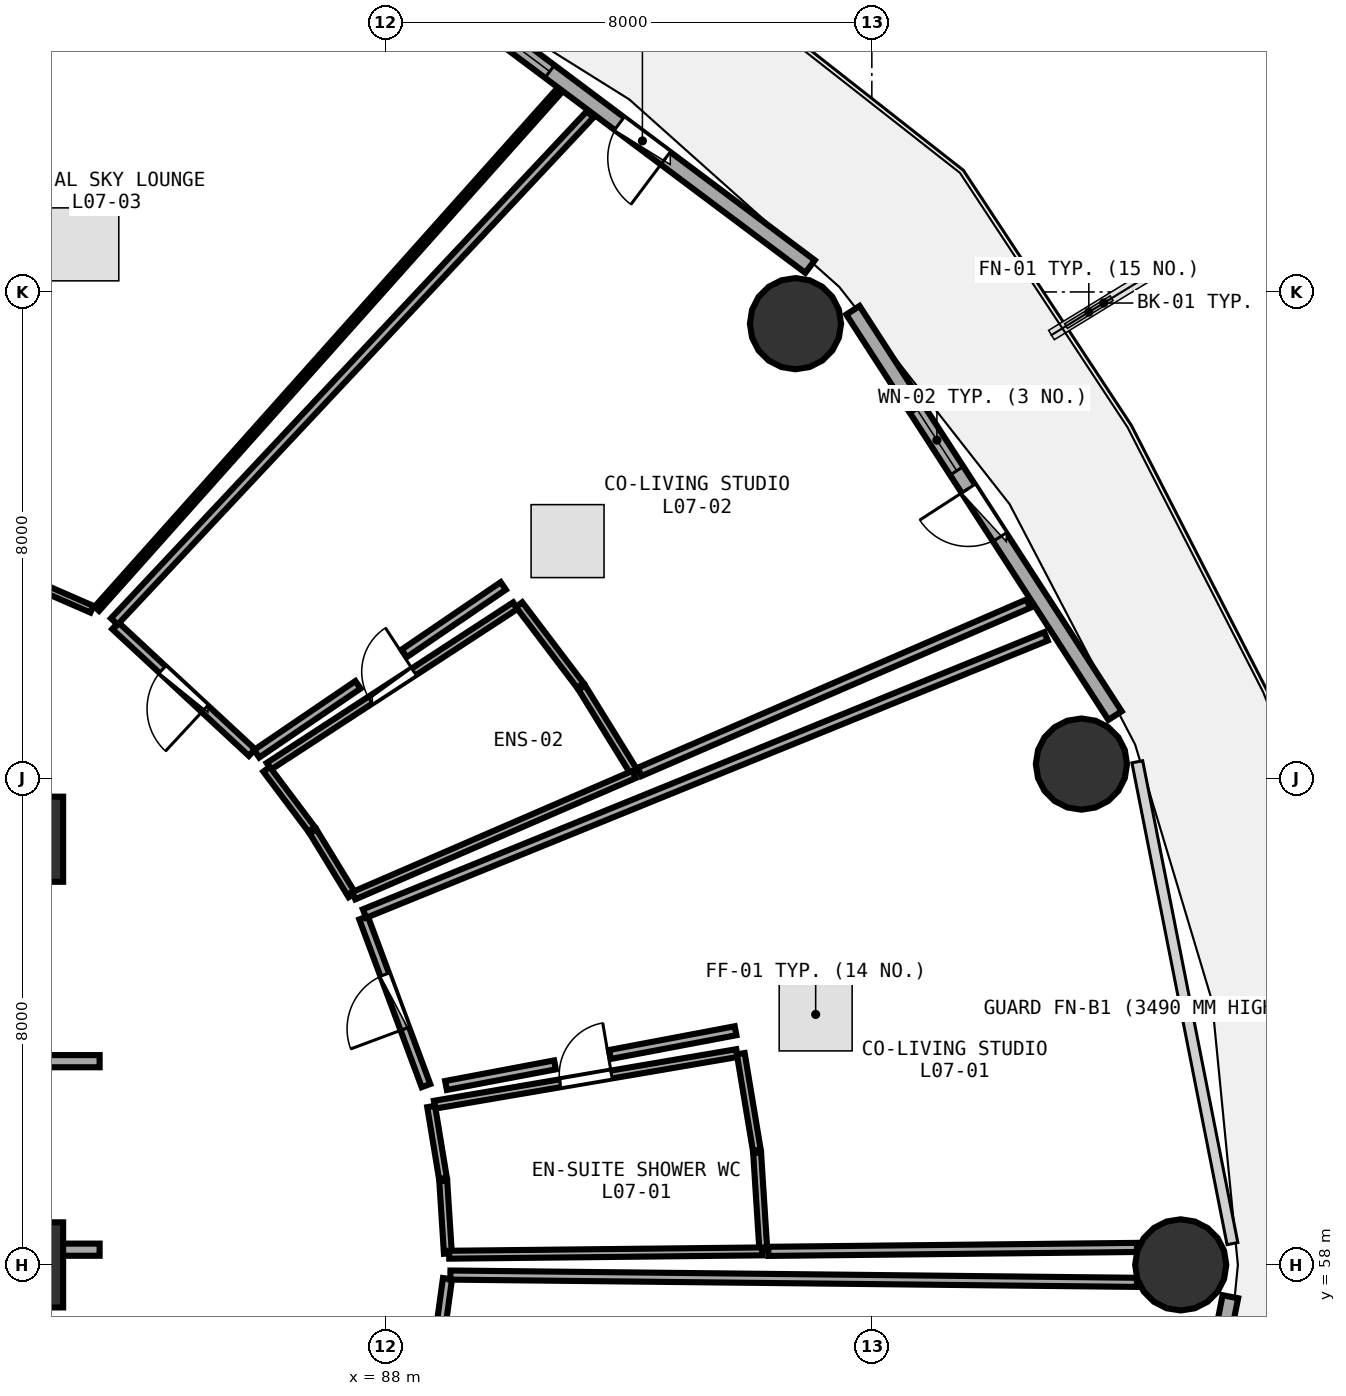
"""IFC4 building model, lengths in metres.
Left out: names, types, materials, properties, quantities, classifications, styles, units other than length and angle.
Written with IfcOpenShell. Run it as: python <this file> out.ifc"""

import sys

from ifc_helpers import new_model, si_unit, direction, frame, frame_2d, origin, origin_2d, place, context, subcontext, project, spatial, rectangle, circle, extrude, element, fill, save


model = new_model("IFC4")
c1 = context("Model", 3, precision=1e-05, world=origin(), true_north=direction((0.0, 1.0)))
c2 = subcontext(c1, "Body", "Model", "MODEL_VIEW")
j1 = project(units=[si_unit("LENGTHUNIT", "METRE"), si_unit("PLANEANGLEUNIT", "RADIAN")], contexts=[c1])
p1 = place(None, origin())
s1 = spatial("IfcSite", under=j1, at=p1, CompositionType="ELEMENT")
p2 = place(p1, origin())
s2 = spatial("IfcBuilding", under=s1, at=p2, CompositionType="ELEMENT")
p3 = place(p2, frame((0.0, 0.0, 30.0)))
s3 = spatial("IfcBuildingStorey", under=s2, at=p3, CompositionType="ELEMENT", Elevation=30.0)
for number, where, z_axis, x_axis in (
    (1, (82.0, 58.0, 0.0), (0.0, 0.0, 1.0), (1.0, 0.0, 0.0)),
    (2, (82.0, 65.0, 0.0), (0.0, 0.0, 1.0), (1.0, 0.0, 0.0)),
):
    element("IfcColumn", number, at=place(p3, frame(where, z_axis=z_axis, x_axis=x_axis)), inside=s3, PredefinedType="PILASTER", context=c2, shape_type="SweptSolid", body=[
        extrude(rectangle(XDim=1.4, YDim=1.4, at=origin_2d()), origin(), (0.0, 0.0, 1.0), 3.75),
    ])
for number, where, z_axis, x_axis in (
    (3, (101.08, 58.0, 0.0), (0.0, 0.0, 1.0), (1.0, 0.0, 0.0)),
    (4, (99.447, 66.236, 0.0), (0.0, 0.0, 1.0), (1.0, 0.0, 0.0)),
    (5, (94.744, 73.478, 0.0), (0.0, 0.0, 1.0), (1.0, 0.0, 0.0)),
):
    element("IfcColumn", number, at=place(p3, frame(where, z_axis=z_axis, x_axis=x_axis)), inside=s3, PredefinedType="COLUMN", context=c2, shape_type="SweptSolid", body=[
        extrude(circle(Radius=0.75, at=origin_2d()), origin(), (0.0, 0.0, 1.0), 3.75),
    ])
p4 = place(p3, frame((99.999, 67.033, 0.0), z_axis=(0.0, 0.0, 1.0), x_axis=(-0.543005114258, 0.839729388488, 0.0)))
e6 = element("IfcWall", 6, at=p4, inside=s3, PredefinedType="SOLIDWALL", context=c2, shape_type="SweptSolid", body=[
    extrude(rectangle(XDim=7.938, YDim=0.26, at=frame_2d((3.969, 0.0))), origin(), (0.0, 0.0, 1.0), 3.475),
])
p5 = place(p4, frame((3.494, 0.0, 0.0)))
e7 = element("IfcOpeningElement", 7, at=p5, cuts=e6, PredefinedType="OPENING", context=c2, shape_type="SweptSolid", body=[
    extrude(rectangle(XDim=0.95, YDim=2.1, at=frame_2d((0.475, 1.05))), frame((0.0, 0.14, 0.0), z_axis=(0.0, -1.0, 0.0), x_axis=(1.0, 0.0, 0.0)), (0.0, 0.0, 1.0), 0.28),
])
p6 = place(p4, frame((4.794, 0.0, 0.85)))
e8 = element("IfcOpeningElement", 8, at=p6, cuts=e6, PredefinedType="OPENING", context=c2, shape_type="SweptSolid", body=[
    extrude(rectangle(XDim=1.2, YDim=1.45, at=frame_2d((0.6, 0.725))), frame((0.0, 0.14, 0.0), z_axis=(0.0, -1.0, 0.0), x_axis=(1.0, 0.0, 0.0)), (0.0, 0.0, 1.0), 0.28),
])
p7 = place(p3, frame((94.984, 74.418, 0.0), z_axis=(0.0, 0.0, 1.0), x_axis=(-0.80030733173, 0.599590005569, 0.0)))
e9 = element("IfcWall", 9, at=p7, inside=s3, PredefinedType="SOLIDWALL", context=c2, shape_type="SweptSolid", body=[
    extrude(rectangle(XDim=8.291, YDim=0.26, at=frame_2d((4.145, 0.0))), origin(), (0.0, 0.0, 1.0), 3.475),
])
p8 = place(p7, frame((2.97, 0.0, 0.0)))
e10 = element("IfcOpeningElement", 10, at=p8, cuts=e9, PredefinedType="OPENING", context=c2, shape_type="SweptSolid", body=[
    extrude(rectangle(XDim=0.95, YDim=2.1, at=frame_2d((0.475, 1.05))), frame((0.0, 0.14, 0.0), z_axis=(0.0, -1.0, 0.0), x_axis=(1.0, 0.0, 0.0)), (0.0, 0.0, 1.0), 0.28),
])
p9 = place(p7, frame((5.35, 0.0, 0.85)))
e11 = element("IfcOpeningElement", 11, at=p9, cuts=e9, PredefinedType="OPENING", context=c2, shape_type="SweptSolid", body=[
    extrude(rectangle(XDim=1.2, YDim=1.45, at=frame_2d((0.6, 0.725))), frame((0.0, 0.14, 0.0), z_axis=(0.0, -1.0, 0.0), x_axis=(1.0, 0.0, 0.0)), (0.0, 0.0, 1.0), 0.28),
])
p10 = place(p3, frame((100.404, 49.92, 0.0), z_axis=(0.0, 0.0, 1.0), x_axis=(0.193726159581, 0.98105564322, 0.0)))
e12 = element("IfcWall", 12, at=p10, inside=s3, PredefinedType="SOLIDWALL", context=c2, shape_type="SweptSolid", body=[
    extrude(rectangle(XDim=7.703, YDim=0.26, at=frame_2d((3.851, 0.0))), origin(), (0.0, 0.0, 1.0), 3.475),
])
p11 = place(p10, frame((3.051, 0.0, 0.85)))
e13 = element("IfcOpeningElement", 13, at=p11, cuts=e12, PredefinedType="OPENING", context=c2, shape_type="SweptSolid", body=[
    extrude(rectangle(XDim=1.6, YDim=1.45, at=frame_2d((0.8, 0.725))), frame((0.0, 0.14, 0.0), z_axis=(0.0, -1.0, 0.0), x_axis=(1.0, 0.0, 0.0)), (0.0, 0.0, 1.0), 0.28),
])
p12 = place(p3, frame((79.3, 61.35, 0.0), z_axis=(0.0, 0.0, 1.0), x_axis=(1.0, 0.0, 0.0)))
e14 = element("IfcWall", 14, at=p12, inside=s3, PredefinedType="SOLIDWALL", context=c2, shape_type="SweptSolid", body=[
    extrude(rectangle(XDim=4.0, YDim=0.2, at=frame_2d((2.0, 0.0))), origin(), (0.0, 0.0, 1.0), 2.775),
])
p13 = place(p12, frame((0.45, 0.0, 0.0)))
e15 = element("IfcOpeningElement", 15, at=p13, cuts=e14, PredefinedType="OPENING", context=c2, shape_type="SweptSolid", body=[
    extrude(rectangle(XDim=1.2, YDim=2.15, at=frame_2d((0.6, 1.075))), frame((0.0, 0.11, 0.0), z_axis=(0.0, -1.0, 0.0), x_axis=(1.0, 0.0, 0.0)), (0.0, 0.0, 1.0), 0.22),
])
p14 = place(p3, frame((79.3, 58.25, 0.0), z_axis=(0.0, 0.0, 1.0), x_axis=(1.0, 0.0, 0.0)))
e16 = element("IfcWall", 16, at=p14, inside=s3, PredefinedType="SOLIDWALL", context=c2, shape_type="SweptSolid", body=[
    extrude(rectangle(XDim=4.0, YDim=0.2, at=frame_2d((2.0, 0.0))), origin(), (0.0, 0.0, 1.0), 2.775),
])
p15 = place(p14, frame((0.5, 0.0, 0.0)))
e17 = element("IfcOpeningElement", 17, at=p15, cuts=e16, PredefinedType="OPENING", context=c2, shape_type="SweptSolid", body=[
    extrude(rectangle(XDim=1.1, YDim=2.1, at=frame_2d((0.55, 1.05))), frame((0.0, 0.11, 0.0), z_axis=(0.0, -1.0, 0.0), x_axis=(1.0, 0.0, 0.0)), (0.0, 0.0, 1.0), 0.22),
])
p16 = place(p3, frame((88.808, 60.634, 0.0), z_axis=(0.0, 0.0, 1.0), x_axis=(0.985746995542, 0.168234540986, 0.0)))
e18 = element("IfcWall", 18, at=p16, inside=s3, PredefinedType="PLUMBINGWALL", context=c2, shape_type="SweptSolid", body=[
    extrude(rectangle(XDim=5.046, YDim=0.13, at=frame_2d((2.523, 0.0))), origin(), (0.0, 0.0, 1.0), 3.175),
])
p17 = place(p16, frame((2.093, 0.0, 0.0)))
e19 = element("IfcOpeningElement", 19, at=p17, cuts=e18, PredefinedType="OPENING", context=c2, shape_type="SweptSolid", body=[
    extrude(rectangle(XDim=0.86, YDim=2.05, at=frame_2d((0.43, 1.025))), frame((0.0, 0.075, 0.0), z_axis=(0.0, -1.0, 0.0), x_axis=(1.0, 0.0, 0.0)), (0.0, 0.0, 1.0), 0.15),
])
p18 = place(p3, frame((88.667, 60.948, 0.0), z_axis=(0.0, 0.0, 1.0), x_axis=(-0.348640514247, 0.937256524024, 0.0)))
e20 = element("IfcWall", 20, at=p18, inside=s3, PredefinedType="PARTITIONING", context=c2, shape_type="SweptSolid", body=[
    extrude(rectangle(XDim=2.943, YDim=0.15, at=frame_2d((1.472, 0.0))), origin(), (0.0, 0.0, 1.0), 3.48),
])
p19 = place(p18, frame((0.997, 0.0, 0.0)))
e21 = element("IfcOpeningElement", 21, at=p19, cuts=e20, PredefinedType="OPENING", context=c2, shape_type="SweptSolid", body=[
    extrude(rectangle(XDim=0.95, YDim=2.08, at=frame_2d((0.475, 1.04))), frame((0.0, 0.085, 0.0), z_axis=(0.0, -1.0, 0.0), x_axis=(1.0, 0.0, 0.0)), (0.0, 0.0, 1.0), 0.17),
])
p20 = place(p3, frame((86.083, 66.2, 0.0), z_axis=(0.0, 0.0, 1.0), x_axis=(0.837796261941, 0.545982988267, 0.0)))
e22 = element("IfcWall", 22, at=p20, inside=s3, PredefinedType="PLUMBINGWALL", context=c2, shape_type="SweptSolid", body=[
    extrude(rectangle(XDim=4.838, YDim=0.13, at=frame_2d((2.419, 0.0))), origin(), (0.0, 0.0, 1.0), 3.235),
])
p21 = place(p20, frame((1.989, 0.0, 0.0)))
e23 = element("IfcOpeningElement", 23, at=p21, cuts=e22, PredefinedType="OPENING", context=c2, shape_type="SweptSolid", body=[
    extrude(rectangle(XDim=0.86, YDim=2.05, at=frame_2d((0.43, 1.025))), frame((0.0, 0.075, 0.0), z_axis=(0.0, -1.0, 0.0), x_axis=(1.0, 0.0, 0.0)), (0.0, 0.0, 1.0), 0.15),
])
p22 = place(p3, frame((85.806, 66.425, 0.0), z_axis=(0.0, 0.0, 1.0), x_axis=(-0.7329267348, 0.680307578538, 0.0)))
e24 = element("IfcWall", 24, at=p22, inside=s3, PredefinedType="PARTITIONING", context=c2, shape_type="SweptSolid", body=[
    extrude(rectangle(XDim=3.067, YDim=0.15, at=frame_2d((1.533, 0.0))), origin(), (0.0, 0.0, 1.0), 2.875),
])
p23 = place(p22, frame((1.059, 0.0, 0.0)))
e25 = element("IfcOpeningElement", 25, at=p23, cuts=e24, PredefinedType="OPENING", context=c2, shape_type="SweptSolid", body=[
    extrude(rectangle(XDim=0.95, YDim=2.08, at=frame_2d((0.475, 1.04))), frame((0.0, 0.085, 0.0), z_axis=(0.0, -1.0, 0.0), x_axis=(1.0, 0.0, 0.0)), (0.0, 0.0, 1.0), 0.17),
])
p24 = place(p3, frame((83.172, 68.783, 0.0), z_axis=(0.0, 0.0, 1.0), x_axis=(-0.916419655578, 0.400218708797, 0.0)))
e26 = element("IfcWall", 26, at=p24, inside=s3, PredefinedType="PARTITIONING", context=c2, shape_type="SweptSolid", body=[
    extrude(rectangle(XDim=6.104, YDim=0.12, at=frame_2d((3.052, 0.0))), origin(), (0.0, 0.0, 1.0), 2.875),
])
p25 = place(p24, frame((2.602, 0.0, 0.0)))
e27 = element("IfcOpeningElement", 27, at=p25, cuts=e26, PredefinedType="OPENING", context=c2, shape_type="SweptSolid", body=[
    extrude(rectangle(XDim=0.9, YDim=2.08, at=frame_2d((0.45, 1.04))), frame((0.0, 0.07, 0.0), z_axis=(0.0, -1.0, 0.0), x_axis=(1.0, 0.0, 0.0)), (0.0, 0.0, 1.0), 0.14),
])
p26 = place(p3, frame((88.625, 54.885, 0.0), z_axis=(0.0, 0.0, 1.0), x_axis=(0.135838186105, 0.990731036758, 0.0)))
e28 = element("IfcWall", 28, at=p26, inside=s3, PredefinedType="PARTITIONING", context=c2, shape_type="SweptSolid", body=[
    extrude(rectangle(XDim=2.915, YDim=0.15, at=frame_2d((1.458, 0.0))), origin(), (0.0, 0.0, 1.0), 3.48),
])
p27 = place(p26, frame((0.983, 0.0, 0.0)))
e29 = element("IfcOpeningElement", 29, at=p27, cuts=e28, PredefinedType="OPENING", context=c2, shape_type="SweptSolid", body=[
    extrude(rectangle(XDim=0.95, YDim=2.08, at=frame_2d((0.475, 1.04))), frame((0.0, 0.085, 0.0), z_axis=(0.0, -1.0, 0.0), x_axis=(1.0, 0.0, 0.0)), (0.0, 0.0, 1.0), 0.17),
])
p28 = place(p3, frame((89.028, 58.187, 0.0), z_axis=(0.0, 0.0, 1.0), x_axis=(-0.063661240763, 0.99797156594, 0.0)))
e30 = element("IfcWall", 30, at=p28, inside=s3, PredefinedType="PLUMBINGWALL", context=c2, shape_type="SweptSolid", body=[
    extrude(rectangle(XDim=1.197, YDim=0.13, at=frame_2d((0.598, 0.0))), origin(), (0.0, 0.0, 1.0), 2.875),
])
p29 = place(p3, frame((88.947, 59.421, 0.0), z_axis=(0.0, 0.0, 1.0), x_axis=(-0.162220174474, 0.986754587014, 0.0)))
e31 = element("IfcWall", 31, at=p29, inside=s3, PredefinedType="PLUMBINGWALL", context=c2, shape_type="SweptSolid", body=[
    extrude(rectangle(XDim=1.199, YDim=0.13, at=frame_2d((0.6, 0.0))), origin(), (0.0, 0.0, 1.0), 3.48),
])
p30 = place(p3, frame((93.844, 61.473, 0.0), z_axis=(0.0, 0.0, 1.0), x_axis=(0.16417773594, -0.986430773558, 0.0)))
e32 = element("IfcWall", 32, at=p30, inside=s3, PredefinedType="PLUMBINGWALL", context=c2, shape_type="SweptSolid", body=[
    extrude(rectangle(XDim=1.611, YDim=0.13, at=frame_2d((0.805, 0.0))), origin(), (0.0, 0.0, 1.0), 3.48),
])
p31 = place(p3, frame((94.113, 59.845, 0.0), z_axis=(0.0, 0.0, 1.0), x_axis=(0.06383542257, -0.997960439509, 0.0)))
e33 = element("IfcWall", 33, at=p31, inside=s3, PredefinedType="PLUMBINGWALL", context=c2, shape_type="SweptSolid", body=[
    extrude(rectangle(XDim=1.606, YDim=0.13, at=frame_2d((0.803, 0.0))), origin(), (0.0, 0.0, 1.0), 3.48),
])
p32 = place(p3, frame((94.197, 58.222, 0.0), z_axis=(0.0, 0.0, 1.0), x_axis=(-0.999944081579, -0.010575146078, 0.0)))
e34 = element("IfcWall", 34, at=p32, inside=s3, PredefinedType="PLUMBINGWALL", context=c2, shape_type="SweptSolid", body=[
    extrude(rectangle(XDim=5.148, YDim=0.13, at=frame_2d((2.574, 0.0))), origin(), (0.0, 0.0, 1.0), 2.875),
])
p33 = place(p3, frame((87.657, 63.778, 0.0), z_axis=(0.0, 0.0, 1.0), x_axis=(0.926333713065, 0.376703931542, 0.0)))
e35 = element("IfcWall", 35, at=p33, inside=s3, PredefinedType="PARTITIONING", context=c2, shape_type="SweptSolid", body=[
    extrude(rectangle(XDim=12.099, YDim=0.15, at=frame_2d((6.05, 0.0))), origin(), (0.0, 0.0, 1.0), 2.875),
])
p34 = place(p3, frame((100.36, 58.287, 0.0), z_axis=(0.0, 0.0, 1.0), x_axis=(-0.999943071294, -0.010670246996, 0.0)))
e36 = element("IfcWall", 36, at=p34, inside=s3, PredefinedType="PARTITIONING", context=c2, shape_type="SweptSolid", body=[
    extrude(rectangle(XDim=6.063, YDim=0.15, at=frame_2d((3.032, 0.0))), origin(), (0.0, 0.0, 1.0), 3.235),
])
p35 = place(p3, frame((93.759, 61.851, 0.0), z_axis=(0.0, 0.0, 1.0), x_axis=(-0.98260291219, -0.185718919219, 0.0)))
e37 = element("IfcWall", 37, at=p35, inside=s3, PredefinedType="PARTITIONING", context=c2, shape_type="SweptSolid", body=[
    extrude(rectangle(XDim=2.102, YDim=0.15, at=frame_2d((1.051, 0.0))), origin(), (0.0, 0.0, 1.0), 3.175),
])
p36 = place(p3, frame((90.789, 61.289, 0.0), z_axis=(0.0, 0.0, 1.0), x_axis=(-0.98259072308, -0.185783397852, 0.0)))
e38 = element("IfcWall", 38, at=p36, inside=s3, PredefinedType="PARTITIONING", context=c2, shape_type="SweptSolid", body=[
    extrude(rectangle(XDim=1.824, YDim=0.15, at=frame_2d((0.912, 0.0))), origin(), (0.0, 0.0, 1.0), 3.235),
])
p37 = place(p3, frame((87.451, 64.08, 0.0), z_axis=(0.0, 0.0, 1.0), x_axis=(-0.52146609248, 0.853272004928, 0.0)))
e39 = element("IfcWall", 39, at=p37, inside=s3, PredefinedType="PLUMBINGWALL", context=c2, shape_type="SweptSolid", body=[
    extrude(rectangle(XDim=1.228, YDim=0.13, at=frame_2d((0.614, 0.0))), origin(), (0.0, 0.0, 1.0), 3.48),
])
p38 = place(p3, frame((86.788, 65.161, 0.0), z_axis=(0.0, 0.0, 1.0), x_axis=(-0.600347056143, 0.79973959023, 0.0)))
e40 = element("IfcWall", 40, at=p38, inside=s3, PredefinedType="PLUMBINGWALL", context=c2, shape_type="SweptSolid", body=[
    extrude(rectangle(XDim=1.238, YDim=0.13, at=frame_2d((0.619, 0.0))), origin(), (0.0, 0.0, 1.0), 2.875),
])
p39 = place(p3, frame((90.199, 68.858, 0.0), z_axis=(0.0, 0.0, 1.0), x_axis=(0.60376191721, -0.797164692725, 0.0)))
e41 = element("IfcWall", 41, at=p39, inside=s3, PredefinedType="PLUMBINGWALL", context=c2, shape_type="SweptSolid", body=[
    extrude(rectangle(XDim=1.669, YDim=0.13, at=frame_2d((0.834, 0.0))), origin(), (0.0, 0.0, 1.0), 3.175),
])
p40 = place(p3, frame((91.229, 67.495, 0.0), z_axis=(0.0, 0.0, 1.0), x_axis=(0.525540089642, -0.850768837099, 0.0)))
e42 = element("IfcWall", 42, at=p40, inside=s3, PredefinedType="PLUMBINGWALL", context=c2, shape_type="SweptSolid", body=[
    extrude(rectangle(XDim=1.651, YDim=0.13, at=frame_2d((0.826, 0.0))), origin(), (0.0, 0.0, 1.0), 3.175),
])
p41 = place(p3, frame((92.09, 66.065, 0.0), z_axis=(0.0, 0.0, 1.0), x_axis=(-0.917797204715, -0.397049481826, 0.0)))
e43 = element("IfcWall", 43, at=p41, inside=s3, PredefinedType="PLUMBINGWALL", context=c2, shape_type="SweptSolid", body=[
    extrude(rectangle(XDim=5.023, YDim=0.13, at=frame_2d((2.511, 0.0))), origin(), (0.0, 0.0, 1.0), 2.875),
])
p42 = place(p3, frame((83.542, 68.581, 0.0), z_axis=(0.0, 0.0, 1.0), x_axis=(0.684261294523, 0.729236916796, 0.0)))
e44 = element("IfcWall", 44, at=p42, inside=s3, PredefinedType="PARTITIONING", context=c2, shape_type="SweptSolid", body=[
    extrude(rectangle(XDim=11.438, YDim=0.15, at=frame_2d((5.719, 0.0))), origin(), (0.0, 0.0, 1.0), 2.875),
])
p43 = place(p3, frame((98.574, 68.874, 0.0), z_axis=(0.0, 0.0, 1.0), x_axis=(-0.917736225937, -0.397190407239, 0.0)))
e45 = element("IfcWall", 45, at=p43, inside=s3, PredefinedType="PARTITIONING", context=c2, shape_type="SweptSolid", body=[
    extrude(rectangle(XDim=6.967, YDim=0.15, at=frame_2d((3.483, 0.0))), origin(), (0.0, 0.0, 1.0), 2.875),
])
p44 = place(p3, frame((89.939, 69.166, 0.0), z_axis=(0.0, 0.0, 1.0), x_axis=(-0.826811291248, -0.562479411769, 0.0)))
e46 = element("IfcWall", 46, at=p44, inside=s3, PredefinedType="PARTITIONING", context=c2, shape_type="SweptSolid", body=[
    extrude(rectangle(XDim=1.971, YDim=0.15, at=frame_2d((0.985, 0.0))), origin(), (0.0, 0.0, 1.0), 3.48),
])
p45 = place(p3, frame((87.549, 67.539, 0.0), z_axis=(0.0, 0.0, 1.0), x_axis=(-0.826867883695, -0.562396215237, 0.0)))
e47 = element("IfcWall", 47, at=p45, inside=s3, PredefinedType="PARTITIONING", context=c2, shape_type="SweptSolid", body=[
    extrude(rectangle(XDim=2.014, YDim=0.15, at=frame_2d((1.007, 0.0))), origin(), (0.0, 0.0, 1.0), 3.235),
])
p46 = place(p3, frame((90.844, 77.294, 0.0), z_axis=(0.0, 0.0, 1.0), x_axis=(-0.66580890104, -0.746122313897, 0.0)))
e48 = element("IfcWall", 48, at=p46, inside=s3, PredefinedType="PARTITIONING", context=c2, shape_type="SweptSolid", body=[
    extrude(rectangle(XDim=11.399, YDim=0.1, at=frame_2d((5.7, 0.0))), origin(), (0.0, 0.0, 1.0), 2.875),
])
p47 = place(p3, frame((89.069, 57.833, 0.0), z_axis=(0.0, 0.0, 1.0), x_axis=(0.999943877154, -0.010594458135, 0.0)))
e49 = element("IfcWall", 49, at=p47, inside=s3, PredefinedType="PARTITIONING", context=c2, shape_type="SweptSolid", body=[
    extrude(rectangle(XDim=11.292, YDim=0.15, at=frame_2d((5.646, 0.0))), origin(), (0.0, 0.0, 1.0), 2.875),
])
p48 = place(p5, frame((0.95, 0.0, 0.0), z_axis=(0.0, 0.0, 1.0), x_axis=(-1.0, 0.0, 0.0)))
e50 = element("IfcDoor", 50, at=p48, inside=s3, OperationType="SINGLE_SWING_LEFT", PredefinedType="DOOR", context=c2, shape_type="SweptSolid", body=[
    extrude(rectangle(XDim=0.95, YDim=2.1, at=frame_2d((0.475, 1.05))), frame((0.0, 0.025, 0.0), z_axis=(0.0, -1.0, 0.0), x_axis=(1.0, 0.0, 0.0)), (0.0, 0.0, 1.0), 0.05),
])
fill(e7, e50)
p49 = place(p6, origin())
e51 = element("IfcWindow", 51, at=p49, inside=s3, PartitioningType="SINGLE_PANEL", PredefinedType="WINDOW", context=c2, shape_type="SweptSolid", body=[
    extrude(rectangle(XDim=1.2, YDim=1.45, at=frame_2d((0.6, 0.725))), frame((0.0, 0.03, 0.0), z_axis=(0.0, -1.0, 0.0), x_axis=(1.0, 0.0, 0.0)), (0.0, 0.0, 1.0), 0.06),
])
fill(e8, e51)
p50 = place(p8, frame((0.95, 0.0, 0.0), z_axis=(0.0, 0.0, 1.0), x_axis=(-1.0, 0.0, 0.0)))
e52 = element("IfcDoor", 52, at=p50, inside=s3, OperationType="SINGLE_SWING_RIGHT", PredefinedType="DOOR", context=c2, shape_type="SweptSolid", body=[
    extrude(rectangle(XDim=0.95, YDim=2.1, at=frame_2d((0.475, 1.05))), frame((0.0, 0.025, 0.0), z_axis=(0.0, -1.0, 0.0), x_axis=(1.0, 0.0, 0.0)), (0.0, 0.0, 1.0), 0.05),
])
fill(e10, e52)
p51 = place(p9, origin())
e53 = element("IfcWindow", 53, at=p51, inside=s3, PartitioningType="SINGLE_PANEL", PredefinedType="WINDOW", context=c2, shape_type="SweptSolid", body=[
    extrude(rectangle(XDim=1.2, YDim=1.45, at=frame_2d((0.6, 0.725))), frame((0.0, 0.03, 0.0), z_axis=(0.0, -1.0, 0.0), x_axis=(1.0, 0.0, 0.0)), (0.0, 0.0, 1.0), 0.06),
])
fill(e11, e53)
p52 = place(p17, origin())
e54 = element("IfcDoor", 54, at=p52, inside=s3, OperationType="SINGLE_SWING_RIGHT", PredefinedType="DOOR", context=c2, shape_type="SweptSolid", body=[
    extrude(rectangle(XDim=0.86, YDim=2.05, at=frame_2d((0.43, 1.025))), frame((0.0, 0.025, 0.0), z_axis=(0.0, -1.0, 0.0), x_axis=(1.0, 0.0, 0.0)), (0.0, 0.0, 1.0), 0.05),
])
fill(e19, e54)
p53 = place(p19, origin())
e55 = element("IfcDoor", 55, at=p53, inside=s3, OperationType="SINGLE_SWING_LEFT", PredefinedType="DOOR", context=c2, shape_type="SweptSolid", body=[
    extrude(rectangle(XDim=0.95, YDim=2.08, at=frame_2d((0.475, 1.04))), frame((0.0, 0.025, 0.0), z_axis=(0.0, -1.0, 0.0), x_axis=(1.0, 0.0, 0.0)), (0.0, 0.0, 1.0), 0.05),
])
fill(e21, e55)
p54 = place(p21, origin())
e56 = element("IfcDoor", 56, at=p54, inside=s3, OperationType="SINGLE_SWING_RIGHT", PredefinedType="DOOR", context=c2, shape_type="SweptSolid", body=[
    extrude(rectangle(XDim=0.86, YDim=2.05, at=frame_2d((0.43, 1.025))), frame((0.0, 0.025, 0.0), z_axis=(0.0, -1.0, 0.0), x_axis=(1.0, 0.0, 0.0)), (0.0, 0.0, 1.0), 0.05),
])
fill(e23, e56)
p55 = place(p23, origin())
e57 = element("IfcDoor", 57, at=p55, inside=s3, OperationType="SINGLE_SWING_LEFT", PredefinedType="DOOR", context=c2, shape_type="SweptSolid", body=[
    extrude(rectangle(XDim=0.95, YDim=2.08, at=frame_2d((0.475, 1.04))), frame((0.0, 0.025, 0.0), z_axis=(0.0, -1.0, 0.0), x_axis=(1.0, 0.0, 0.0)), (0.0, 0.0, 1.0), 0.05),
])
fill(e25, e57)
save(model, sys.argv[1])
